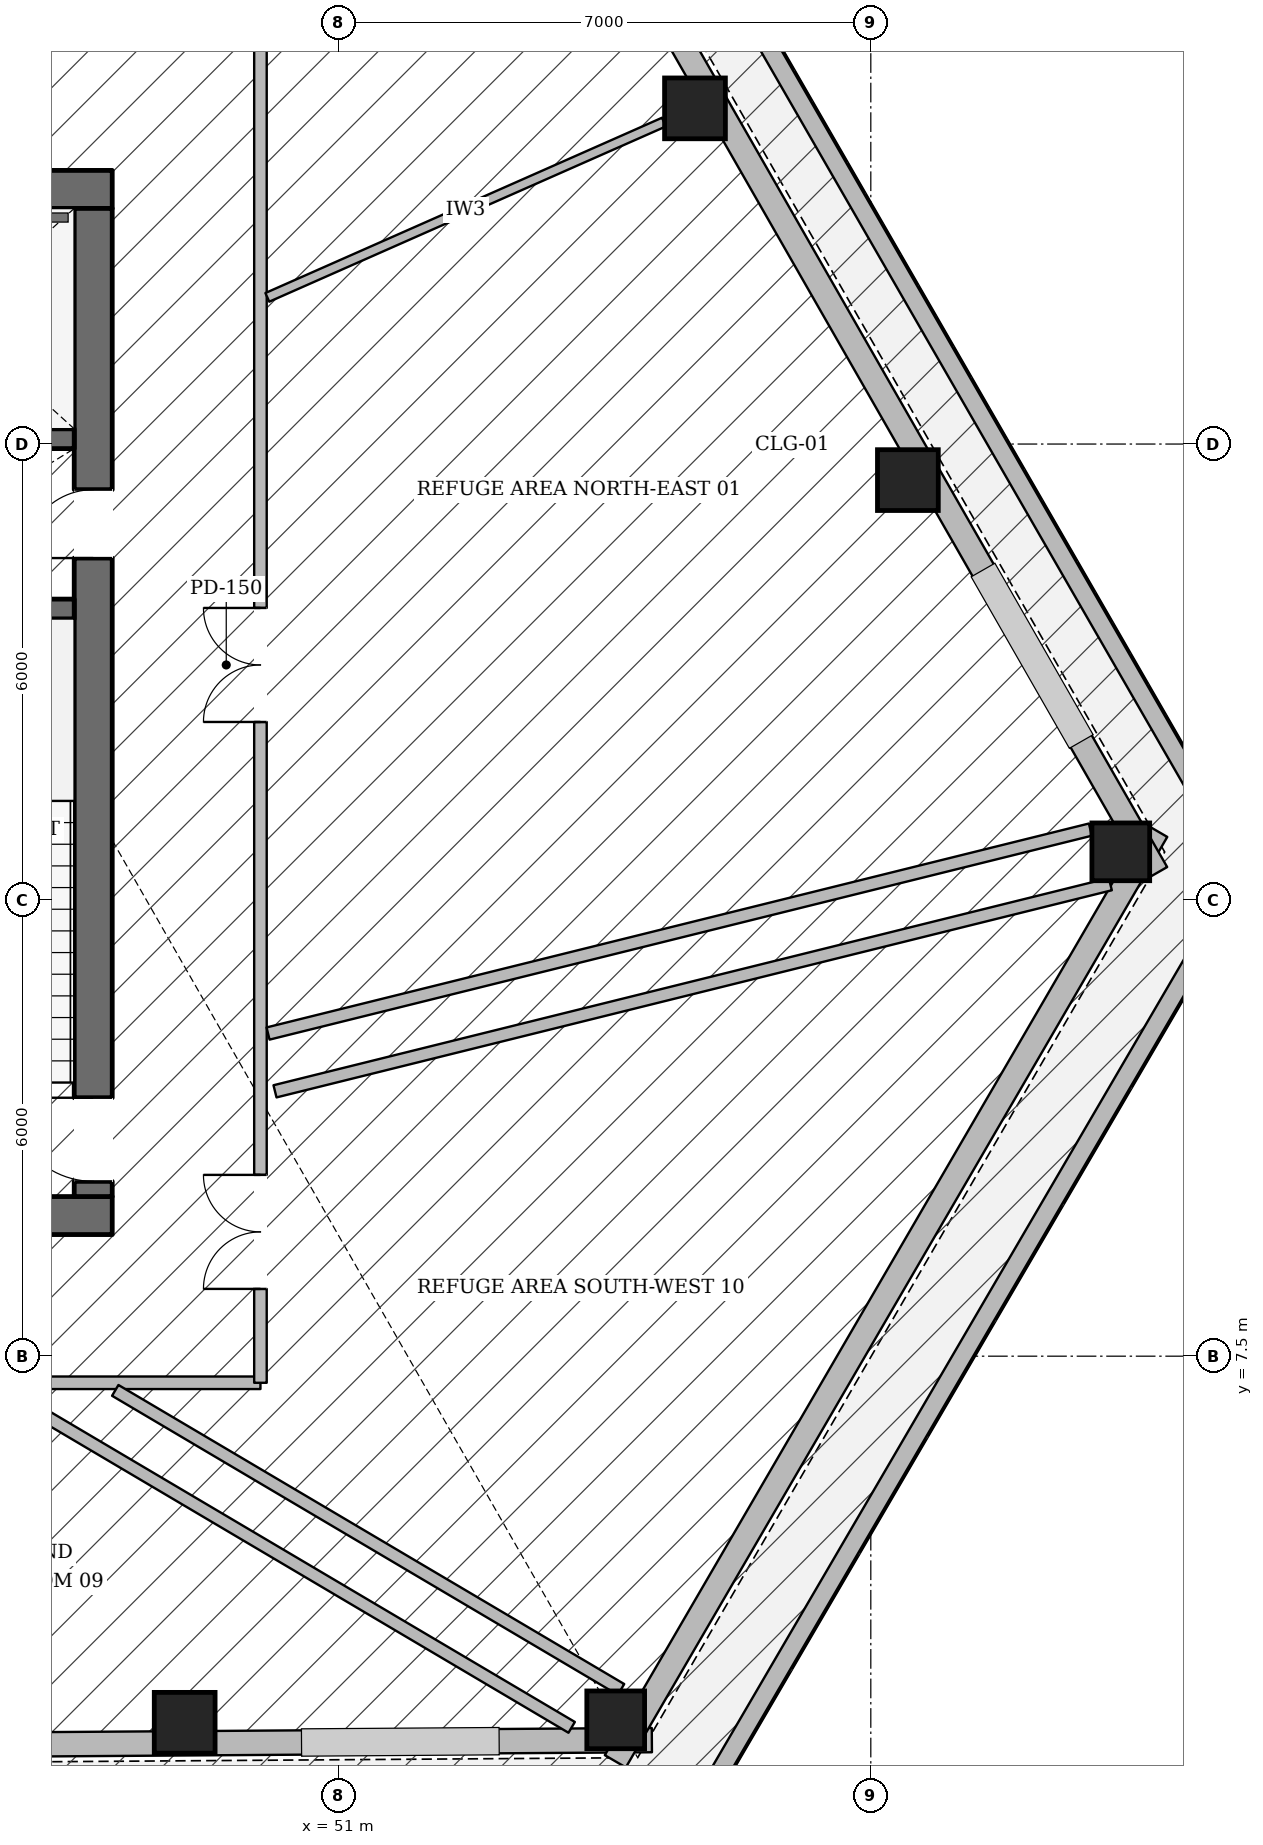
"""IFC4 building model, lengths in metres.
Left out: names, types, materials, properties, quantities, classifications, styles, units other than length and angle.
Written with IfcOpenShell. Run it as: python <this file> out.ifc"""

import sys

from ifc_helpers import new_model, si_unit, direction, frame, frame_2d, origin, origin_2d, place, context, subcontext, project, spatial, rectangle, hollow_rectangle, extrude, element, fill, save


model = new_model("IFC4")
c1 = context("Model", 3, precision=1e-05, world=origin(), true_north=direction((0.0, 1.0)))
c2 = subcontext(c1, "Body", "Model", "MODEL_VIEW")
j1 = project(units=[si_unit("LENGTHUNIT", "METRE"), si_unit("PLANEANGLEUNIT", "RADIAN")], contexts=[c1])
p1 = place(None, origin())
s1 = spatial("IfcSite", under=j1, at=p1, CompositionType="ELEMENT")
p2 = place(p1, origin())
s2 = spatial("IfcBuilding", under=s1, at=p2, CompositionType="ELEMENT")
p3 = place(p2, frame((0.0, 0.0, 75.3)))
s3 = spatial("IfcBuildingStorey", under=s2, at=p3, CompositionType="ELEMENT", Elevation=75.3)
p4 = place(p3, frame((27.98, 9.35, 0.0), z_axis=(0.0, 0.0, 1.0), x_axis=(1.0, 0.0, 0.0)))
e1 = element("IfcWall", 1, at=p4, inside=s3, PredefinedType="SOLIDWALL", context=c2, shape_type="SweptSolid", body=[
    extrude(rectangle(XDim=20.04, YDim=0.5, at=frame_2d((10.02, 0.0))), origin(), (0.0, 0.0, 1.0), 4.985),
])
p5 = place(p4, frame((10.52, 0.0, 0.0)))
e2 = element("IfcOpeningElement", 2, at=p5, cuts=e1, PredefinedType="OPENING", context=c2, shape_type="SweptSolid", body=[
    extrude(rectangle(XDim=1.4, YDim=2.2, at=frame_2d((0.7, 1.1))), frame((0.0, 0.26, 0.0), z_axis=(0.0, -1.0, 0.0), x_axis=(1.0, 0.0, 0.0)), (0.0, 0.0, 1.0), 0.52),
])
p6 = place(p3, frame((27.98, 22.85, 0.0), z_axis=(0.0, 0.0, 1.0), x_axis=(1.0, 0.0, 0.0)))
e3 = element("IfcWall", 3, at=p6, inside=s3, PredefinedType="SOLIDWALL", context=c2, shape_type="SweptSolid", body=[
    extrude(rectangle(XDim=20.04, YDim=0.5, at=frame_2d((10.02, 0.0))), origin(), (0.0, 0.0, 1.0), 4.985),
])
p7 = place(p6, frame((6.295, 0.0, 0.0)))
e4 = element("IfcOpeningElement", 4, at=p7, cuts=e3, PredefinedType="OPENING", context=c2, shape_type="SweptSolid", body=[
    extrude(rectangle(XDim=1.05, YDim=2.15, at=frame_2d((0.525, 1.075))), frame((0.0, 0.26, 0.0), z_axis=(0.0, -1.0, 0.0), x_axis=(1.0, 0.0, 0.0)), (0.0, 0.0, 1.0), 0.52),
])
p8 = place(p6, frame((12.695, 0.0, 0.0)))
e5 = element("IfcOpeningElement", 5, at=p8, cuts=e3, PredefinedType="OPENING", context=c2, shape_type="SweptSolid", body=[
    extrude(rectangle(XDim=1.05, YDim=2.15, at=frame_2d((0.525, 1.075))), frame((0.0, 0.26, 0.0), z_axis=(0.0, -1.0, 0.0), x_axis=(1.0, 0.0, 0.0)), (0.0, 0.0, 1.0), 0.52),
])
p9 = place(p3, frame((47.77, 9.6, 0.0), z_axis=(0.0, 0.0, 1.0), x_axis=(0.0, 1.0, 0.0)))
e6 = element("IfcWall", 6, at=p9, inside=s3, PredefinedType="SOLIDWALL", context=c2, shape_type="SweptSolid", body=[
    extrude(rectangle(XDim=13.0, YDim=0.5, at=frame_2d((6.5, 0.0))), origin(), (0.0, 0.0, 1.0), 4.985),
])
p10 = place(p9, frame((0.2, 0.0, 0.0)))
e7 = element("IfcOpeningElement", 7, at=p10, cuts=e6, PredefinedType="OPENING", context=c2, shape_type="SweptSolid", body=[
    extrude(rectangle(XDim=1.1, YDim=2.15, at=frame_2d((0.55, 1.075))), frame((0.0, 0.26, 0.0), z_axis=(0.0, -1.0, 0.0), x_axis=(1.0, 0.0, 0.0)), (0.0, 0.0, 1.0), 0.52),
])
p11 = place(p9, frame((8.4, 0.0, 0.0)))
e8 = element("IfcOpeningElement", 8, at=p11, cuts=e6, PredefinedType="OPENING", context=c2, shape_type="SweptSolid", body=[
    extrude(rectangle(XDim=0.9, YDim=2.1, at=frame_2d((0.45, 1.05))), frame((0.0, 0.26, 0.0), z_axis=(0.0, -1.0, 0.0), x_axis=(1.0, 0.0, 0.0)), (0.0, 0.0, 1.0), 0.52),
])
for number, where, z_axis, x_axis in (
    (9, (44.32, 17.33, 0.0), (0.0, 0.0, 1.0), (1.0, 0.0, 0.0)),
    (10, (44.32, 19.57, 0.0), (0.0, 0.0, 1.0), (1.0, 0.0, 0.0)),
):
    element("IfcWall", number, at=place(p3, frame(where, z_axis=z_axis, x_axis=x_axis)), inside=s3, PredefinedType="SHEAR", context=c2, shape_type="SweptSolid", body=[
        extrude(rectangle(XDim=3.2, YDim=0.26, at=frame_2d((1.6, 0.0))), origin(), (0.0, 0.0, 1.0), 4.985),
    ])
p12 = place(p3, frame((48.973, 2.677, 0.0), z_axis=(0.0, 0.0, 1.0), x_axis=(1.0, 0.0, 0.0)))
e11 = element("IfcColumn", 11, at=p12, inside=s3, PredefinedType="COLUMN", context=c2, shape_type="SweptSolid", body=[
    extrude(hollow_rectangle(XDim=0.8, YDim=0.8, WallThickness=0.036, at=origin_2d()), origin(), (0.0, 0.0, 1.0), 4.985),
])
for number, where, z_axis, x_axis in (
    (12, (54.644, 2.716, 0.0), (0.0, 0.0, 1.0), (1.0, 0.0, 0.0)),
    (13, (61.289, 14.135, 0.0), (0.0, 0.0, 1.0), (1.0, 0.0, 0.0)),
):
    element("IfcColumn", number, at=place(p3, frame(where, z_axis=z_axis, x_axis=x_axis)), inside=s3, PredefinedType="COLUMN", context=c2, shape_type="SweptSolid", body=[
        extrude(hollow_rectangle(XDim=0.76, YDim=0.76, WallThickness=0.035, at=origin_2d()), origin(), (0.0, 0.0, 1.0), 4.985),
    ])
for number, where, z_axis, x_axis in (
    (14, (58.488, 19.026, 0.0), (0.0, 0.0, 1.0), (1.0, 0.0, 0.0)),
    (15, (55.687, 23.916, 0.0), (0.0, 0.0, 1.0), (1.0, 0.0, 0.0)),
):
    element("IfcColumn", number, at=place(p3, frame(where, z_axis=z_axis, x_axis=x_axis)), inside=s3, PredefinedType="COLUMN", context=c2, shape_type="SweptSolid", body=[
        extrude(hollow_rectangle(XDim=0.8, YDim=0.8, WallThickness=0.036, at=origin_2d()), origin(), (0.0, 0.0, 1.0), 4.985),
    ])
p13 = place(p3, frame((55.119, 2.449, 0.0), z_axis=(0.0, 0.0, 1.0), x_axis=(-0.999976414427, -0.00686808493, 0.0)))
e16 = element("IfcWall", 16, at=p13, inside=s3, PredefinedType="STANDARD", context=c2, shape_type="SweptSolid", body=[
    extrude(rectangle(XDim=34.978, YDim=0.32, at=frame_2d((17.489, 0.0))), origin(), (0.0, 0.0, 1.0), 3.677),
])
p14 = place(p3, frame((61.762, 14.412, 0.0), z_axis=(0.0, 0.0, 1.0), x_axis=(-0.502945792992, -0.864317956143, 0.0)))
e17 = element("IfcWall", 17, at=p14, inside=s3, PredefinedType="STANDARD", context=c2, shape_type="SweptSolid", body=[
    extrude(rectangle(XDim=14.163, YDim=0.32, at=frame_2d((7.082, 0.0))), origin(), (0.0, 0.0, 1.0), 3.677),
])
p15 = place(p3, frame((44.478, 44.029, 0.0), z_axis=(0.0, 0.0, 1.0), x_axis=(0.497006709314, -0.867746697428, 0.0)))
e18 = element("IfcWall", 18, at=p15, inside=s3, PredefinedType="STANDARD", context=c2, shape_type="SweptSolid", body=[
    extrude(rectangle(XDim=34.773, YDim=0.32, at=frame_2d((17.386, 0.0))), origin(), (0.0, 0.0, 1.0), 3.677),
])
p16 = place(p3, frame((55.562, 1.259, 0.0), z_axis=(0.0, 0.0, 1.0), x_axis=(0.504414565423, 0.863461606668, 0.0)))
e19 = element("IfcWall", 19, at=p16, inside=s3, PredefinedType="PARAPET", context=c2, shape_type="SweptSolid", body=[
    extrude(rectangle(XDim=14.771, YDim=0.24, at=frame_2d((7.385, 0.0))), origin(), (0.0, 0.0, 1.0), 1.25),
])
p17 = place(p3, frame((63.012, 13.699, 0.0), z_axis=(0.0, 0.0, 1.0), x_axis=(-0.499261971682, 0.866451085539, 0.0)))
e20 = element("IfcWall", 20, at=p17, inside=s3, PredefinedType="PARAPET", context=c2, shape_type="SweptSolid", body=[
    extrude(rectangle(XDim=36.021, YDim=0.24, at=frame_2d((18.01, 0.0))), origin(), (0.0, 0.0, 1.0), 1.25),
])
p18 = place(p3, frame((26.03, 7.15, 0.0), z_axis=(0.0, 0.0, 1.0), x_axis=(1.0, 0.0, 0.0)))
e21 = element("IfcWall", 21, at=p18, inside=s3, PredefinedType="PARTITIONING", context=c2, shape_type="SweptSolid", body=[
    extrude(rectangle(XDim=23.94, YDim=0.165, at=frame_2d((11.97, 0.0))), origin(), (0.0, 0.0, 1.0), 2.825),
])
p19 = place(p18, frame((8.652, 0.0, 0.0)))
e22 = element("IfcOpeningElement", 22, at=p19, cuts=e21, PredefinedType="OPENING", context=c2, shape_type="SweptSolid", body=[
    extrude(rectangle(XDim=1.5, YDim=2.25, at=frame_2d((0.75, 1.125))), frame((0.0, 0.093, 0.0), z_axis=(0.0, -1.0, 0.0), x_axis=(1.0, 0.0, 0.0)), (0.0, 0.0, 1.0), 0.185),
])
p20 = place(p18, frame((17.295, 0.0, 0.0)))
e23 = element("IfcOpeningElement", 23, at=p20, cuts=e21, PredefinedType="OPENING", context=c2, shape_type="SweptSolid", body=[
    extrude(rectangle(XDim=1.5, YDim=2.25, at=frame_2d((0.75, 1.125))), frame((0.0, 0.093, 0.0), z_axis=(0.0, -1.0, 0.0), x_axis=(1.0, 0.0, 0.0)), (0.0, 0.0, 1.0), 0.185),
])
p21 = place(p3, frame((49.97, 7.15, 0.0), z_axis=(0.0, 0.0, 1.0), x_axis=(0.0, 1.0, 0.0)))
e24 = element("IfcWall", 24, at=p21, inside=s3, PredefinedType="PARTITIONING", context=c2, shape_type="SweptSolid", body=[
    extrude(rectangle(XDim=17.9, YDim=0.165, at=frame_2d((8.95, 0.0))), origin(), (0.0, 0.0, 1.0), 4.673),
])
p22 = place(p21, frame((8.694, 0.0, 0.0)))
e25 = element("IfcOpeningElement", 25, at=p22, cuts=e24, PredefinedType="OPENING", context=c2, shape_type="SweptSolid", body=[
    extrude(rectangle(XDim=1.5, YDim=2.25, at=frame_2d((0.75, 1.125))), frame((0.0, 0.093, 0.0), z_axis=(0.0, -1.0, 0.0), x_axis=(1.0, 0.0, 0.0)), (0.0, 0.0, 1.0), 0.185),
])
p23 = place(p21, frame((1.235, 0.0, 0.0)))
e26 = element("IfcOpeningElement", 26, at=p23, cuts=e24, PredefinedType="OPENING", context=c2, shape_type="SweptSolid", body=[
    extrude(rectangle(XDim=1.5, YDim=2.25, at=frame_2d((0.75, 1.125))), frame((0.0, 0.093, 0.0), z_axis=(0.0, -1.0, 0.0), x_axis=(1.0, 0.0, 0.0)), (0.0, 0.0, 1.0), 0.185),
])
p24 = place(p3, frame((48.06, 7.05, 0.0), z_axis=(0.0, 0.0, 1.0), x_axis=(0.860791315367, -0.50895806447, 0.0)))
e27 = element("IfcWall", 27, at=p24, inside=s3, PredefinedType="PARTITIONING", context=c2, shape_type="SweptSolid", body=[
    extrude(rectangle(XDim=7.73, YDim=0.165, at=frame_2d((3.865, 0.0))), origin(), (0.0, 0.0, 1.0), 4.985),
])
p25 = place(p3, frame((47.12, 6.723, 0.0), z_axis=(0.0, 0.0, 1.0), x_axis=(0.860793963914, -0.508953585005, 0.0)))
e28 = element("IfcWall", 28, at=p25, inside=s3, PredefinedType="PARTITIONING", context=c2, shape_type="SweptSolid", body=[
    extrude(rectangle(XDim=8.068, YDim=0.165, at=frame_2d((4.034, 0.0))), origin(), (0.0, 0.0, 1.0), 3.68),
])
p26 = place(p3, frame((50.07, 11.745, 0.0), z_axis=(0.0, 0.0, 1.0), x_axis=(0.970601993591, 0.240690195143, 0.0)))
e29 = element("IfcWall", 29, at=p26, inside=s3, PredefinedType="PARTITIONING", context=c2, shape_type="SweptSolid", body=[
    extrude(rectangle(XDim=11.146, YDim=0.165, at=frame_2d((5.573, 0.0))), origin(), (0.0, 0.0, 1.0), 4.985),
])
p27 = place(p3, frame((50.162, 10.984, 0.0), z_axis=(0.0, 0.0, 1.0), x_axis=(0.970603697432, 0.240683324167, 0.0)))
e30 = element("IfcWall", 30, at=p27, inside=s3, PredefinedType="PARTITIONING", context=c2, shape_type="SweptSolid", body=[
    extrude(rectangle(XDim=11.322, YDim=0.165, at=frame_2d((5.661, 0.0))), origin(), (0.0, 0.0, 1.0), 4.673),
])
p28 = place(p3, frame((50.061, 21.43, 0.0), z_axis=(0.0, 0.0, 1.0), x_axis=(0.914660112996, 0.404223796545, 0.0)))
e31 = element("IfcWall", 31, at=p28, inside=s3, PredefinedType="PARTITIONING", context=c2, shape_type="SweptSolid", body=[
    extrude(rectangle(XDim=5.705, YDim=0.125, at=frame_2d((2.853, 0.0))), origin(), (0.0, 0.0, 1.0), 3.68),
])
p29 = place(p10, origin())
e32 = element("IfcDoor", 32, at=p29, inside=s3, OperationType="SINGLE_SWING_RIGHT", PredefinedType="DOOR", context=c2, shape_type="SweptSolid", body=[
    extrude(rectangle(XDim=1.1, YDim=2.15, at=frame_2d((0.55, 1.075))), frame((0.0, 0.025, 0.0), z_axis=(0.0, -1.0, 0.0), x_axis=(1.0, 0.0, 0.0)), (0.0, 0.0, 1.0), 0.05),
])
fill(e7, e32)
p30 = place(p11, origin())
e33 = element("IfcDoor", 33, at=p30, inside=s3, OperationType="SINGLE_SWING_LEFT", PredefinedType="DOOR", context=c2, shape_type="SweptSolid", body=[
    extrude(rectangle(XDim=0.9, YDim=2.1, at=frame_2d((0.45, 1.05))), frame((0.0, 0.025, 0.0), z_axis=(0.0, -1.0, 0.0), x_axis=(1.0, 0.0, 0.0)), (0.0, 0.0, 1.0), 0.05),
])
fill(e8, e33)
p31 = place(p22, origin())
e34 = element("IfcDoor", 34, at=p31, inside=s3, OperationType="DOUBLE_DOOR_SINGLE_SWING", PredefinedType="DOOR", context=c2, shape_type="SweptSolid", body=[
    extrude(rectangle(XDim=1.5, YDim=2.25, at=frame_2d((0.75, 1.125))), frame((0.0, 0.025, 0.0), z_axis=(0.0, -1.0, 0.0), x_axis=(1.0, 0.0, 0.0)), (0.0, 0.0, 1.0), 0.05),
])
fill(e25, e34)
p32 = place(p23, origin())
e35 = element("IfcDoor", 35, at=p32, inside=s3, OperationType="DOUBLE_DOOR_SINGLE_SWING", PredefinedType="DOOR", context=c2, shape_type="SweptSolid", body=[
    extrude(rectangle(XDim=1.5, YDim=2.25, at=frame_2d((0.75, 1.125))), frame((0.0, 0.025, 0.0), z_axis=(0.0, -1.0, 0.0), x_axis=(1.0, 0.0, 0.0)), (0.0, 0.0, 1.0), 0.05),
])
fill(e26, e35)
save(model, sys.argv[1])
